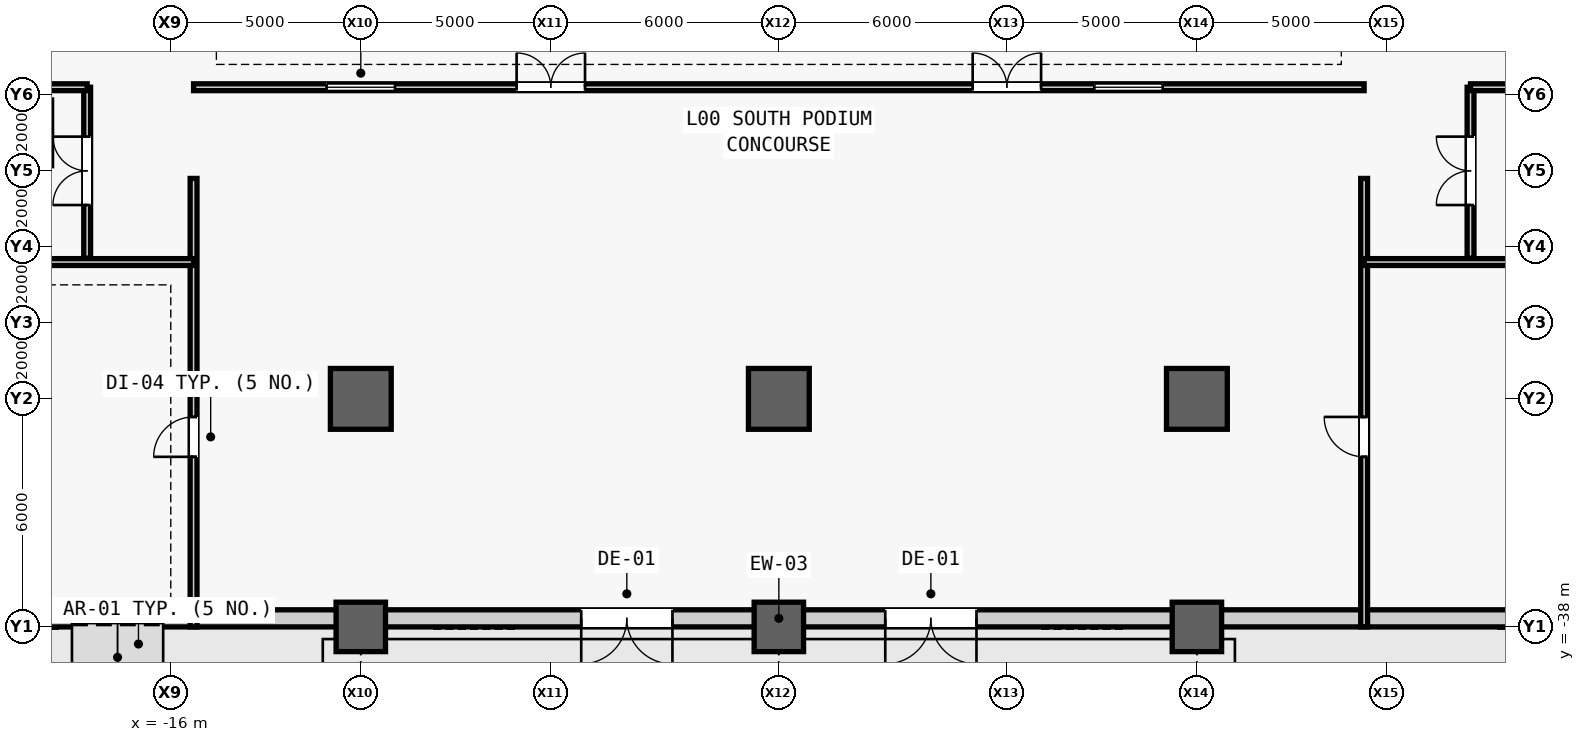
"""IFC4 building model, lengths in metres.
Left out: names, types, materials, properties, quantities, classifications, styles, units other than length and angle.
Written with IfcOpenShell. Run it as: python <this file> out.ifc"""

import sys

from ifc_helpers import new_model, si_unit, direction, frame, frame_2d, origin, origin_2d, place, context, subcontext, project, spatial, rectangle, extrude, source, transform, mapped, element, fill, save


model = new_model("IFC4")
c1 = context("Model", 3, precision=1e-05, world=origin(), true_north=direction((0.0, 1.0)))
c2 = subcontext(c1, "Body", "Model", "MODEL_VIEW")
j1 = project(units=[si_unit("LENGTHUNIT", "METRE"), si_unit("PLANEANGLEUNIT", "RADIAN")], contexts=[c1])
p1 = place(None, origin())
s1 = spatial("IfcSite", under=j1, at=p1, CompositionType="ELEMENT")
p2 = place(p1, origin())
s2 = spatial("IfcBuilding", under=s1, at=p2, CompositionType="ELEMENT")
p3 = place(p2, origin())
s3 = spatial("IfcBuildingStorey", under=s2, at=p3, CompositionType="ELEMENT", Elevation=0.0)
m1 = source(origin(), c2, "Body", "SweptSolid", [
    extrude(rectangle(XDim=1.3, YDim=1.3, at=origin_2d()), origin(), (0.0, 0.0, 1.0), 6.6),
])
p4 = place(p3, frame((-11.0, -38.0, 0.0), z_axis=(0.0, 0.0, 1.0), x_axis=(1.0, 0.0, 0.0)))
e1 = element("IfcColumn", 1, at=p4, inside=s3, PredefinedType="COLUMN", context=c2, shape_type="MappedRepresentation", body=[
    mapped(m1, transform((0.0, 0.0, 0.0), scale=1.0)),
])
m2 = source(origin(), c2, "Body", "SweptSolid", [
    extrude(rectangle(XDim=1.6, YDim=1.6, at=origin_2d()), origin(), (0.0, 0.0, 1.0), 6.6),
])
p5 = place(p3, frame((-11.0, -32.0, 0.0), z_axis=(0.0, 0.0, 1.0), x_axis=(1.0, 0.0, 0.0)))
e2 = element("IfcColumn", 2, at=p5, inside=s3, PredefinedType="COLUMN", context=c2, shape_type="MappedRepresentation", body=[
    mapped(m2, transform((0.0, 0.0, 0.0), scale=1.0)),
])
p6 = place(p3, frame((0.0, -38.0, 0.0), z_axis=(0.0, 0.0, 1.0), x_axis=(1.0, 0.0, 0.0)))
e3 = element("IfcColumn", 3, at=p6, inside=s3, PredefinedType="COLUMN", context=c2, shape_type="MappedRepresentation", body=[
    mapped(m1, transform((0.0, 0.0, 0.0), scale=1.0)),
])
p7 = place(p3, frame((0.0, -32.0, 0.0), z_axis=(0.0, 0.0, 1.0), x_axis=(1.0, 0.0, 0.0)))
e4 = element("IfcColumn", 4, at=p7, inside=s3, PredefinedType="COLUMN", context=c2, shape_type="MappedRepresentation", body=[
    mapped(m2, transform((0.0, 0.0, 0.0), scale=1.0)),
])
p8 = place(p3, frame((11.0, -38.0, 0.0), z_axis=(0.0, 0.0, 1.0), x_axis=(1.0, 0.0, 0.0)))
e5 = element("IfcColumn", 5, at=p8, inside=s3, PredefinedType="COLUMN", context=c2, shape_type="MappedRepresentation", body=[
    mapped(m1, transform((0.0, 0.0, 0.0), scale=1.0)),
])
p9 = place(p3, frame((11.0, -32.0, 0.0), z_axis=(0.0, 0.0, 1.0), x_axis=(1.0, 0.0, 0.0)))
e6 = element("IfcColumn", 6, at=p9, inside=s3, PredefinedType="COLUMN", context=c2, shape_type="MappedRepresentation", body=[
    mapped(m2, transform((0.0, 0.0, 0.0), scale=1.0)),
])
m3 = source(origin(), c2, "Body", "SweptSolid", [
    extrude(rectangle(XDim=92.0, YDim=0.45, at=frame_2d((46.0, 0.0))), origin(), (0.0, 0.0, 1.0), 4.48),
])
p10 = place(p3, frame((46.0, -37.775, 0.0), z_axis=(0.0, 0.0, 1.0), x_axis=(-1.0, 0.0, 0.0)))
e7 = element("IfcWall", 7, at=p10, inside=s3, PredefinedType="STANDARD", context=c2, shape_type="MappedRepresentation", body=[
    mapped(m3, transform((0.0, 0.0, 0.0), scale=1.0)),
])
m4 = source(origin(), c2, "Body", "SweptSolid", [
    extrude(rectangle(XDim=2.4, YDim=2.8, at=frame_2d((1.2, 1.4))), frame((0.0, 0.235, 0.0), z_axis=(0.0, -1.0, 0.0), x_axis=(1.0, 0.0, 0.0)), (0.0, 0.0, 1.0), 0.47),
])
p11 = place(p10, frame((48.8, 0.0, 0.0)))
e8 = element("IfcOpeningElement", 8, at=p11, cuts=e7, PredefinedType="OPENING", context=c2, shape_type="MappedRepresentation", body=[
    mapped(m4, transform((0.0, 0.0, 0.0), scale=1.0)),
])
p12 = place(p10, frame((40.8, 0.0, 0.0)))
e9 = element("IfcOpeningElement", 9, at=p12, cuts=e7, PredefinedType="OPENING", context=c2, shape_type="MappedRepresentation", body=[
    mapped(m4, transform((0.0, 0.0, 0.0), scale=1.0)),
])
m5 = source(origin(), c2, "Body", "SweptSolid", [
    extrude(rectangle(XDim=1.8, YDim=2.4, at=frame_2d((0.9, 1.2))), frame((0.0, 0.235, 0.0), z_axis=(0.0, -1.0, 0.0), x_axis=(1.0, 0.0, 0.0)), (0.0, 0.0, 1.0), 0.47),
])
p13 = place(p10, frame((71.1, 0.0, 0.0)))
e10 = element("IfcOpeningElement", 10, at=p13, cuts=e7, PredefinedType="OPENING", context=c2, shape_type="MappedRepresentation", body=[
    mapped(m5, transform((0.0, 0.0, 0.0), scale=1.0)),
])
p14 = place(p10, frame((19.1, 0.0, 0.0)))
e11 = element("IfcOpeningElement", 11, at=p14, cuts=e7, PredefinedType="OPENING", context=c2, shape_type="MappedRepresentation", body=[
    mapped(m5, transform((0.0, 0.0, 0.0), scale=1.0)),
])
m6 = source(origin(), c2, "Body", "SweptSolid", [
    extrude(rectangle(XDim=30.8, YDim=0.18, at=frame_2d((15.4, 0.0))), origin(), (0.0, 0.0, 1.0), 4.08),
])
p15 = place(p3, frame((-15.4, -23.8, 0.0), z_axis=(0.0, 0.0, 1.0), x_axis=(1.0, 0.0, 0.0)))
e12 = element("IfcWall", 12, at=p15, inside=s3, PredefinedType="PARTITIONING", context=c2, shape_type="MappedRepresentation", body=[
    mapped(m6, transform((0.0, 0.0, 0.0), scale=1.0)),
])
m7 = source(origin(), c2, "Body", "SweptSolid", [
    extrude(rectangle(XDim=1.8, YDim=2.25, at=frame_2d((0.9, 1.125))), frame((0.0, 0.1, 0.0), z_axis=(0.0, -1.0, 0.0), x_axis=(1.0, 0.0, 0.0)), (0.0, 0.0, 1.0), 0.2),
])
p16 = place(p15, frame((8.5, 0.0, 0.0)))
e13 = element("IfcOpeningElement", 13, at=p16, cuts=e12, PredefinedType="OPENING", context=c2, shape_type="MappedRepresentation", body=[
    mapped(m7, transform((0.0, 0.0, 0.0), scale=1.0)),
])
p17 = place(p15, frame((20.5, 0.0, 0.0)))
e14 = element("IfcOpeningElement", 14, at=p17, cuts=e12, PredefinedType="OPENING", context=c2, shape_type="MappedRepresentation", body=[
    mapped(m7, transform((0.0, 0.0, 0.0), scale=1.0)),
])
m8 = source(origin(), c2, "Body", "SweptSolid", [
    extrude(rectangle(XDim=1.8, YDim=1.4, at=frame_2d((0.9, 0.7))), frame((0.0, 0.1, 0.0), z_axis=(0.0, -1.0, 0.0), x_axis=(1.0, 0.0, 0.0)), (0.0, 0.0, 1.0), 0.2),
])
p18 = place(p15, frame((3.5, 0.0, 0.9)))
e15 = element("IfcOpeningElement", 15, at=p18, cuts=e12, PredefinedType="OPENING", context=c2, shape_type="MappedRepresentation", body=[
    mapped(m8, transform((0.0, 0.0, 0.0), scale=1.0)),
])
p19 = place(p15, frame((23.7, 0.0, 0.9)))
e16 = element("IfcOpeningElement", 16, at=p19, cuts=e12, PredefinedType="OPENING", context=c2, shape_type="MappedRepresentation", body=[
    mapped(m8, transform((0.0, 0.0, 0.0), scale=1.0)),
])
m9 = source(origin(), c2, "Body", "SweptSolid", [
    extrude(rectangle(XDim=11.8, YDim=0.18, at=frame_2d((5.9, 0.0))), origin(), (0.0, 0.0, 1.0), 6.28),
])
p20 = place(p3, frame((-15.4, -38.0, 0.0), z_axis=(0.0, 0.0, 1.0), x_axis=(0.0, 1.0, 0.0)))
e17 = element("IfcWall", 17, at=p20, inside=s3, PredefinedType="PARTITIONING", context=c2, shape_type="MappedRepresentation", body=[
    mapped(m9, transform((0.0, 0.0, 0.0), scale=1.0)),
])
m10 = source(origin(), c2, "Body", "SweptSolid", [
    extrude(rectangle(XDim=1.05, YDim=2.2, at=frame_2d((0.525, 1.1))), frame((0.0, 0.1, 0.0), z_axis=(0.0, -1.0, 0.0), x_axis=(1.0, 0.0, 0.0)), (0.0, 0.0, 1.0), 0.2),
])
p21 = place(p20, frame((4.475, 0.0, 0.0)))
e18 = element("IfcOpeningElement", 18, at=p21, cuts=e17, PredefinedType="OPENING", context=c2, shape_type="MappedRepresentation", body=[
    mapped(m10, transform((0.0, 0.0, 0.0), scale=1.0)),
])
p22 = place(p3, frame((15.4, -38.0, 0.0), z_axis=(0.0, 0.0, 1.0), x_axis=(0.0, 1.0, 0.0)))
e19 = element("IfcWall", 19, at=p22, inside=s3, PredefinedType="PARTITIONING", context=c2, shape_type="MappedRepresentation", body=[
    mapped(m9, transform((0.0, 0.0, 0.0), scale=1.0)),
])
p23 = place(p22, frame((4.475, 0.0, 0.0)))
e20 = element("IfcOpeningElement", 20, at=p23, cuts=e19, PredefinedType="OPENING", context=c2, shape_type="MappedRepresentation", body=[
    mapped(m10, transform((0.0, 0.0, 0.0), scale=1.0)),
])
m11 = source(origin(), c2, "Body", "SweptSolid", [
    extrude(rectangle(XDim=30.6, YDim=0.18, at=frame_2d((15.3, 0.0))), origin(), (0.0, 0.0, 1.0), 4.08),
])
for number, where, z_axis, x_axis in (
    (21, (-46.0, -28.4, 0.0), (0.0, 0.0, 1.0), (1.0, 0.0, 0.0)),
    (22, (15.4, -28.4, 0.0), (0.0, 0.0, 1.0), (1.0, 0.0, 0.0)),
):
    element("IfcWall", number, at=place(p3, frame(where, z_axis=z_axis, x_axis=x_axis)), inside=s3, PredefinedType="PARTITIONING", context=c2, shape_type="MappedRepresentation", body=[
        mapped(m11, transform((0.0, 0.0, 0.0), scale=1.0)),
    ])
m12 = source(origin(), c2, "Body", "SweptSolid", [
    extrude(rectangle(XDim=4.5, YDim=0.18, at=frame_2d((2.25, 0.0))), origin(), (0.0, 0.0, 1.0), 6.28),
])
p24 = place(p3, frame((-18.2, -28.3, 0.0), z_axis=(0.0, 0.0, 1.0), x_axis=(0.0, 1.0, 0.0)))
e23 = element("IfcWall", 23, at=p24, inside=s3, PredefinedType="PARTITIONING", context=c2, shape_type="MappedRepresentation", body=[
    mapped(m12, transform((0.0, 0.0, 0.0), scale=1.0)),
])
p25 = place(p24, frame((1.4, 0.0, 0.0)))
e24 = element("IfcOpeningElement", 24, at=p25, cuts=e23, PredefinedType="OPENING", context=c2, shape_type="MappedRepresentation", body=[
    mapped(m7, transform((0.0, 0.0, 0.0), scale=1.0)),
])
m13 = source(origin(), c2, "Body", "SweptSolid", [
    extrude(rectangle(XDim=7.3, YDim=0.18, at=frame_2d((3.65, 0.0))), origin(), (0.0, 0.0, 1.0), 4.08),
])
p26 = place(p3, frame((-25.5, -23.8, 0.0), z_axis=(0.0, 0.0, 1.0), x_axis=(1.0, 0.0, 0.0)))
e25 = element("IfcWall", 25, at=p26, inside=s3, PredefinedType="PARTITIONING", context=c2, shape_type="MappedRepresentation", body=[
    mapped(m13, transform((0.0, 0.0, 0.0), scale=1.0)),
])
p27 = place(p26, frame((4.4, 0.0, 0.0)))
e26 = element("IfcOpeningElement", 26, at=p27, cuts=e25, PredefinedType="OPENING", context=c2, shape_type="MappedRepresentation", body=[
    mapped(m7, transform((0.0, 0.0, 0.0), scale=1.0)),
])
p28 = place(p3, frame((18.2, -28.3, 0.0), z_axis=(0.0, 0.0, 1.0), x_axis=(0.0, 1.0, 0.0)))
e27 = element("IfcWall", 27, at=p28, inside=s3, PredefinedType="PARTITIONING", context=c2, shape_type="MappedRepresentation", body=[
    mapped(m12, transform((0.0, 0.0, 0.0), scale=1.0)),
])
p29 = place(p28, frame((1.4, 0.0, 0.0)))
e28 = element("IfcOpeningElement", 28, at=p29, cuts=e27, PredefinedType="OPENING", context=c2, shape_type="MappedRepresentation", body=[
    mapped(m7, transform((0.0, 0.0, 0.0), scale=1.0)),
])
p30 = place(p3, frame((18.2, -23.8, 0.0), z_axis=(0.0, 0.0, 1.0), x_axis=(1.0, 0.0, 0.0)))
e29 = element("IfcWall", 29, at=p30, inside=s3, PredefinedType="PARTITIONING", context=c2, shape_type="MappedRepresentation", body=[
    mapped(m13, transform((0.0, 0.0, 0.0), scale=1.0)),
])
p31 = place(p30, frame((1.1, 0.0, 0.0)))
e30 = element("IfcOpeningElement", 30, at=p31, cuts=e29, PredefinedType="OPENING", context=c2, shape_type="MappedRepresentation", body=[
    mapped(m7, transform((0.0, 0.0, 0.0), scale=1.0)),
])
m14 = source(origin(), c2, "Body", "SweptSolid", [
    extrude(rectangle(XDim=2.4, YDim=2.8, at=frame_2d((1.2, 1.4))), frame((0.0, 0.025, 0.0), z_axis=(0.0, -1.0, 0.0), x_axis=(1.0, 0.0, 0.0)), (0.0, 0.0, 1.0), 0.05),
])
p32 = place(p11, origin())
e31 = element("IfcDoor", 31, at=p32, inside=s3, OperationType="DOUBLE_DOOR_SINGLE_SWING", PredefinedType="DOOR", context=c2, shape_type="MappedRepresentation", body=[
    mapped(m14, transform((0.0, 0.0, 0.0), scale=1.0)),
])
fill(e8, e31)
p33 = place(p12, origin())
e32 = element("IfcDoor", 32, at=p33, inside=s3, OperationType="DOUBLE_DOOR_SINGLE_SWING", PredefinedType="DOOR", context=c2, shape_type="MappedRepresentation", body=[
    mapped(m14, transform((0.0, 0.0, 0.0), scale=1.0)),
])
fill(e9, e32)
m15 = source(origin(), c2, "Body", "SweptSolid", [
    extrude(rectangle(XDim=1.8, YDim=2.25, at=frame_2d((0.9, 1.125))), frame((0.0, 0.025, 0.0), z_axis=(0.0, -1.0, 0.0), x_axis=(1.0, 0.0, 0.0)), (0.0, 0.0, 1.0), 0.05),
])
p34 = place(p16, origin())
e33 = element("IfcDoor", 33, at=p34, inside=s3, OperationType="SINGLE_SWING_LEFT", PredefinedType="DOOR", context=c2, shape_type="MappedRepresentation", body=[
    mapped(m15, transform((0.0, 0.0, 0.0), scale=1.0)),
])
fill(e13, e33)
p35 = place(p17, origin())
e34 = element("IfcDoor", 34, at=p35, inside=s3, OperationType="SINGLE_SWING_RIGHT", PredefinedType="DOOR", context=c2, shape_type="MappedRepresentation", body=[
    mapped(m15, transform((0.0, 0.0, 0.0), scale=1.0)),
])
fill(e14, e34)
m16 = source(origin(), c2, "Body", "SweptSolid", [
    extrude(rectangle(XDim=1.05, YDim=2.2, at=frame_2d((0.525, 1.1))), frame((0.0, 0.025, 0.0), z_axis=(0.0, -1.0, 0.0), x_axis=(1.0, 0.0, 0.0)), (0.0, 0.0, 1.0), 0.05),
])
p36 = place(p21, origin())
e35 = element("IfcDoor", 35, at=p36, inside=s3, OperationType="SINGLE_SWING_LEFT", PredefinedType="DOOR", context=c2, shape_type="MappedRepresentation", body=[
    mapped(m16, transform((0.0, 0.0, 0.0), scale=1.0)),
])
fill(e18, e35)
p37 = place(p23, origin())
e36 = element("IfcDoor", 36, at=p37, inside=s3, OperationType="SINGLE_SWING_RIGHT", PredefinedType="DOOR", context=c2, shape_type="MappedRepresentation", body=[
    mapped(m16, transform((0.0, 0.0, 0.0), scale=1.0)),
])
fill(e20, e36)
p38 = place(p25, origin())
e37 = element("IfcDoor", 37, at=p38, inside=s3, OperationType="SINGLE_SWING_LEFT", PredefinedType="DOOR", context=c2, shape_type="MappedRepresentation", body=[
    mapped(m15, transform((0.0, 0.0, 0.0), scale=1.0)),
])
fill(e24, e37)
p39 = place(p29, origin())
e38 = element("IfcDoor", 38, at=p39, inside=s3, OperationType="SINGLE_SWING_RIGHT", PredefinedType="DOOR", context=c2, shape_type="MappedRepresentation", body=[
    mapped(m15, transform((0.0, 0.0, 0.0), scale=1.0)),
])
fill(e28, e38)
m17 = source(origin(), c2, "Body", "SweptSolid", [
    extrude(rectangle(XDim=1.8, YDim=1.4, at=frame_2d((0.9, 0.7))), frame((0.0, 0.03, 0.0), z_axis=(0.0, -1.0, 0.0), x_axis=(1.0, 0.0, 0.0)), (0.0, 0.0, 1.0), 0.06),
])
p40 = place(p18, origin())
e39 = element("IfcWindow", 39, at=p40, inside=s3, PartitioningType="SINGLE_PANEL", PredefinedType="WINDOW", context=c2, shape_type="MappedRepresentation", body=[
    mapped(m17, transform((0.0, 0.0, 0.0), scale=1.0)),
])
fill(e15, e39)
p41 = place(p19, origin())
e40 = element("IfcWindow", 40, at=p41, inside=s3, PartitioningType="SINGLE_PANEL", PredefinedType="WINDOW", context=c2, shape_type="MappedRepresentation", body=[
    mapped(m17, transform((0.0, 0.0, 0.0), scale=1.0)),
])
fill(e16, e40)
save(model, sys.argv[1])
